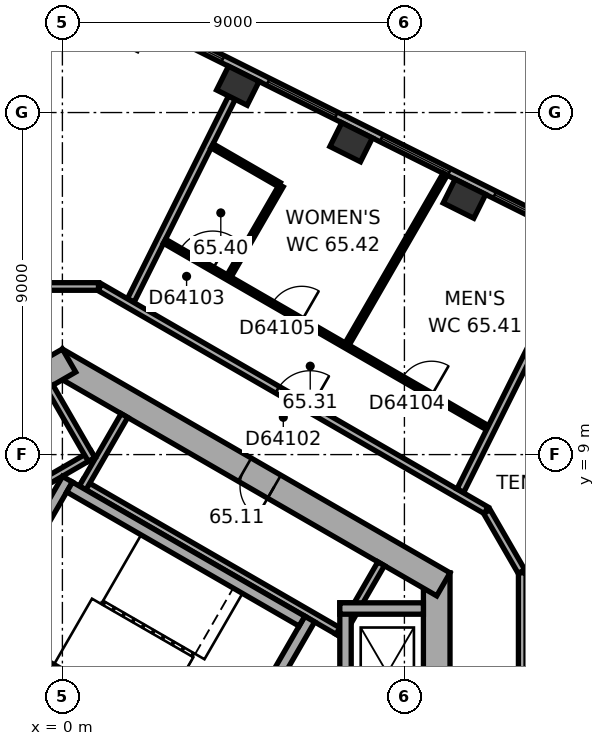
"""IFC4 building model, lengths in metres.
Left out: names, types, materials, properties, quantities, classifications, styles, units other than length and angle.
Written with IfcOpenShell. Run it as: python <this file> out.ifc"""

import sys

from ifc_helpers import new_model, si_unit, direction, frame, frame_2d, origin, origin_2d, place, context, subcontext, project, spatial, rectangle, extrude, element, fill, save


model = new_model("IFC4")
c1 = context("Model", 3, precision=1e-05, world=origin(), true_north=direction((0.0, 1.0)))
c2 = subcontext(c1, "Body", "Model", "MODEL_VIEW")
j1 = project(units=[si_unit("LENGTHUNIT", "METRE"), si_unit("PLANEANGLEUNIT", "RADIAN")], contexts=[c1])
p1 = place(None, origin())
s1 = spatial("IfcSite", under=j1, at=p1, CompositionType="ELEMENT")
p2 = place(p1, origin())
s2 = spatial("IfcBuilding", under=s1, at=p2, CompositionType="ELEMENT")
p3 = place(p2, frame((0.0, 0.0, 263.5)))
s3 = spatial("IfcBuildingStorey", under=s2, at=p3, CompositionType="ELEMENT", Elevation=263.5)
for number, where, z_axis, x_axis in (
    (1, (10.58, 15.732, 0.0), (0.0, 0.0, 1.0), (-0.895, 0.446, 0.0)),
    (2, (7.598, 17.219, 0.0), (0.0, 0.0, 1.0), (-0.895, 0.446, 0.0)),
    (3, (4.616, 18.706, 0.0), (0.0, 0.0, 1.0), (-0.895, 0.446, 0.0)),
):
    element("IfcColumn", number, at=place(p3, frame(where, z_axis=z_axis, x_axis=x_axis)), inside=s3, PredefinedType="COLUMN", context=c2, shape_type="SweptSolid", body=[
        extrude(rectangle(XDim=0.9, YDim=0.7, at=origin_2d()), origin(), (0.0, 0.0, 1.0), 3.7),
    ])
p4 = place(p3, frame((9.85, -5.889, 0.0), z_axis=(0.0, 0.0, 1.0), x_axis=(0.0, 1.0, 0.0)))
e4 = element("IfcWall", 4, at=p4, inside=s3, PredefinedType="SHEAR", context=c2, shape_type="SweptSolid", body=[
    extrude(rectangle(XDim=11.778, YDim=0.7, at=frame_2d((5.889, 0.0))), origin(), (0.0, 0.0, 1.0), 3.7),
])
p5 = place(p4, frame((6.089, 0.0, 0.0)))
e5 = element("IfcOpeningElement", 5, at=p5, cuts=e4, PredefinedType="OPENING", context=c2, shape_type="SweptSolid", body=[
    extrude(rectangle(XDim=1.5, YDim=2.1, at=frame_2d((0.75, 1.05))), frame((0.0, 0.36, 0.0), z_axis=(0.0, -1.0, 0.0), x_axis=(1.0, 0.0, 0.0)), (0.0, 0.0, 1.0), 0.72),
])
p6 = place(p4, frame((2.939, 0.0, 0.0)))
e6 = element("IfcOpeningElement", 6, at=p6, cuts=e4, PredefinedType="OPENING", context=c2, shape_type="SweptSolid", body=[
    extrude(rectangle(XDim=0.9, YDim=2.1, at=frame_2d((0.45, 1.05))), frame((0.0, 0.36, 0.0), z_axis=(0.0, -1.0, 0.0), x_axis=(1.0, 0.0, 0.0)), (0.0, 0.0, 1.0), 0.72),
])
p7 = place(p3, frame((10.025, 5.586, 0.0), z_axis=(0.0, 0.0, 1.0), x_axis=(-0.866026453023, 0.499998182661, 0.0)))
e7 = element("IfcWall", 7, at=p7, inside=s3, PredefinedType="SHEAR", context=c2, shape_type="SweptSolid", body=[
    extrude(rectangle(XDim=11.778, YDim=0.7, at=frame_2d((5.889, 0.0))), origin(), (0.0, 0.0, 1.0), 3.7),
])
p8 = place(p7, frame((5.139, 0.0, 0.0)))
e8 = element("IfcOpeningElement", 8, at=p8, cuts=e7, PredefinedType="OPENING", context=c2, shape_type="SweptSolid", body=[
    extrude(rectangle(XDim=0.9, YDim=2.1, at=frame_2d((0.45, 1.05))), frame((0.0, 0.36, 0.0), z_axis=(0.0, -1.0, 0.0), x_axis=(1.0, 0.0, 0.0)), (0.0, 0.0, 1.0), 0.72),
])
p9 = place(p3, frame((0.175, 11.475, 0.0), z_axis=(0.0, 0.0, 1.0), x_axis=(-0.866026453023, -0.499998182661, 0.0)))
e9 = element("IfcWall", 9, at=p9, inside=s3, PredefinedType="SHEAR", context=c2, shape_type="SweptSolid", body=[
    extrude(rectangle(XDim=11.778, YDim=0.7, at=frame_2d((5.889, 0.0))), origin(), (0.0, 0.0, 1.0), 3.7),
])
p10 = place(p9, frame((6.089, 0.0, 0.0)))
e10 = element("IfcOpeningElement", 10, at=p10, cuts=e9, PredefinedType="OPENING", context=c2, shape_type="SweptSolid", body=[
    extrude(rectangle(XDim=1.5, YDim=2.1, at=frame_2d((0.75, 1.05))), frame((0.0, 0.36, 0.0), z_axis=(0.0, -1.0, 0.0), x_axis=(1.0, 0.0, 0.0)), (0.0, 0.0, 1.0), 0.72),
])
p11 = place(p9, frame((2.939, 0.0, 0.0)))
e11 = element("IfcOpeningElement", 11, at=p11, cuts=e9, PredefinedType="OPENING", context=c2, shape_type="SweptSolid", body=[
    extrude(rectangle(XDim=0.9, YDim=2.1, at=frame_2d((0.45, 1.05))), frame((0.0, 0.36, 0.0), z_axis=(0.0, -1.0, 0.0), x_axis=(1.0, 0.0, 0.0)), (0.0, 0.0, 1.0), 0.72),
])
p12 = place(p3, frame((17.223, 12.923, 0.0), z_axis=(0.0, 0.0, 1.0), x_axis=(-0.894930561148, 0.44620543556, 0.0)))
e12 = element("IfcWall", 12, at=p12, inside=s3, PredefinedType="STANDARD", context=c2, shape_type="SweptSolid", body=[
    extrude(rectangle(XDim=17.731, YDim=0.2, at=frame_2d((8.866, 0.0))), origin(), (0.0, 0.0, 1.0), 3.7),
])
p13 = place(p12, frame((1.202, 0.0, 0.9)))
e13 = element("IfcOpeningElement", 13, at=p13, cuts=e12, PredefinedType="OPENING", context=c2, shape_type="SweptSolid", body=[
    extrude(rectangle(XDim=2.0, YDim=2.0, at=frame_2d((1.0, 1.0))), frame((0.0, 0.11, 0.0), z_axis=(0.0, -1.0, 0.0), x_axis=(1.0, 0.0, 0.0)), (0.0, 0.0, 1.0), 0.22),
])
p14 = place(p12, frame((4.533, 0.0, 0.9)))
e14 = element("IfcOpeningElement", 14, at=p14, cuts=e12, PredefinedType="OPENING", context=c2, shape_type="SweptSolid", body=[
    extrude(rectangle(XDim=2.0, YDim=2.0, at=frame_2d((1.0, 1.0))), frame((0.0, 0.11, 0.0), z_axis=(0.0, -1.0, 0.0), x_axis=(1.0, 0.0, 0.0)), (0.0, 0.0, 1.0), 0.22),
])
p15 = place(p12, frame((7.865, 0.0, 0.9)))
e15 = element("IfcOpeningElement", 15, at=p15, cuts=e12, PredefinedType="OPENING", context=c2, shape_type="SweptSolid", body=[
    extrude(rectangle(XDim=2.0, YDim=2.0, at=frame_2d((1.0, 1.0))), frame((0.0, 0.11, 0.0), z_axis=(0.0, -1.0, 0.0), x_axis=(1.0, 0.0, 0.0)), (0.0, 0.0, 1.0), 0.22),
])
p16 = place(p12, frame((11.197, 0.0, 0.9)))
e16 = element("IfcOpeningElement", 16, at=p16, cuts=e12, PredefinedType="OPENING", context=c2, shape_type="SweptSolid", body=[
    extrude(rectangle(XDim=2.0, YDim=2.0, at=frame_2d((1.0, 1.0))), frame((0.0, 0.11, 0.0), z_axis=(0.0, -1.0, 0.0), x_axis=(1.0, 0.0, 0.0)), (0.0, 0.0, 1.0), 0.22),
])
p17 = place(p12, frame((14.528, 0.0, 0.9)))
e17 = element("IfcOpeningElement", 17, at=p17, cuts=e12, PredefinedType="OPENING", context=c2, shape_type="SweptSolid", body=[
    extrude(rectangle(XDim=2.0, YDim=2.0, at=frame_2d((1.0, 1.0))), frame((0.0, 0.11, 0.0), z_axis=(0.0, -1.0, 0.0), x_axis=(1.0, 0.0, 0.0)), (0.0, 0.0, 1.0), 0.22),
])
p18 = place(p3, frame((7.424, 4.259, 0.0), z_axis=(0.0, 0.0, 1.0), x_axis=(-0.866026010844, 0.49999894854, 0.0)))
e18 = element("IfcWall", 18, at=p18, inside=s3, PredefinedType="PARTITIONING", context=c2, shape_type="SweptSolid", body=[
    extrude(rectangle(XDim=8.0, YDim=0.2, at=frame_2d((4.0, 0.0))), origin(), (0.0, 0.0, 1.0), 3.42),
])
for number, where, z_axis, x_axis in (
    (19, (7.287, 4.222, 0.0), (0.0, 0.0, 1.0), (0.5, 0.866, 0.0)),
    (20, (0.532, 8.122, 0.0), (0.0, 0.0, 1.0), (0.5, 0.866, 0.0)),
):
    element("IfcWall", number, at=place(p3, frame(where, z_axis=z_axis, x_axis=x_axis)), inside=s3, PredefinedType="PARTITIONING", context=c2, shape_type="SweptSolid", body=[
        extrude(rectangle(XDim=2.2, YDim=0.2, at=frame_2d((1.1, 0.0))), origin(), (0.0, 0.0, 1.0), 3.42),
    ])
p19 = place(p3, frame((0.803, 9.009, 0.0), z_axis=(0.0, 0.0, 1.0), x_axis=(-0.866028230842, -0.499995103361, 0.0)))
e21 = element("IfcWall", 21, at=p19, inside=s3, PredefinedType="PARTITIONING", context=c2, shape_type="SweptSolid", body=[
    extrude(rectangle(XDim=5.4, YDim=0.2, at=frame_2d((2.7, 0.0))), origin(), (0.0, 0.0, 1.0), 3.42),
])
p20 = place(p3, frame((0.767, 8.872, 0.0), z_axis=(0.0, 0.0, 1.0), x_axis=(-0.499994660107, 0.866028486751, 0.0)))
e22 = element("IfcWall", 22, at=p20, inside=s3, PredefinedType="PARTITIONING", context=c2, shape_type="SweptSolid", body=[
    extrude(rectangle(XDim=2.2, YDim=0.2, at=frame_2d((1.1, 0.0))), origin(), (0.0, 0.0, 1.0), 3.42),
])
p21 = place(p3, frame((4.158, 0.602, 0.0), z_axis=(0.0, 0.0, 1.0), x_axis=(0.499977259774, 0.866038532462, 0.0)))
e23 = element("IfcWall", 23, at=p21, inside=s3, PredefinedType="SHEAR", context=c2, shape_type="SweptSolid", body=[
    extrude(rectangle(XDim=4.7, YDim=0.3, at=frame_2d((2.35, 0.0))), origin(), (0.0, 0.0, 1.0), 3.42),
])
p22 = place(p21, frame((0.8, 0.0, 0.0)))
e24 = element("IfcOpeningElement", 24, at=p22, cuts=e23, PredefinedType="OPENING", context=c2, shape_type="SweptSolid", body=[
    extrude(rectangle(XDim=1.2, YDim=2.1, at=frame_2d((0.6, 1.05))), frame((0.0, 0.16, 0.0), z_axis=(0.0, -1.0, 0.0), x_axis=(1.0, 0.0, 0.0)), (0.0, 0.0, 1.0), 0.32),
])
p23 = place(p3, frame((-2.216, 4.282, 0.0), z_axis=(0.0, 0.0, 1.0), x_axis=(0.499977259774, 0.866038532462, 0.0)))
e25 = element("IfcWall", 25, at=p23, inside=s3, PredefinedType="SHEAR", context=c2, shape_type="SweptSolid", body=[
    extrude(rectangle(XDim=4.7, YDim=0.3, at=frame_2d((2.35, 0.0))), origin(), (0.0, 0.0, 1.0), 3.42),
])
for number, where, z_axis, x_axis in (
    (26, (4.103, 0.807, 0.0), (0.0, 0.0, 1.0), (-0.866, 0.5, 0.0)),
    (27, (6.303, 4.617, 0.0), (0.0, 0.0, 1.0), (-0.866, 0.5, 0.0)),
):
    element("IfcWall", number, at=place(p3, frame(where, z_axis=z_axis, x_axis=x_axis)), inside=s3, PredefinedType="SHEAR", context=c2, shape_type="SweptSolid", body=[
        extrude(rectangle(XDim=7.06, YDim=0.3, at=frame_2d((3.53, 0.0))), origin(), (0.0, 0.0, 1.0), 3.42),
    ])
p24 = place(p3, frame((7.45, 1.75, 0.0), z_axis=(0.0, 0.0, 1.0), x_axis=(0.0, 1.0, 0.0)))
e28 = element("IfcWall", 28, at=p24, inside=s3, PredefinedType="SHEAR", context=c2, shape_type="SweptSolid", body=[
    extrude(rectangle(XDim=3.35, YDim=0.3, at=frame_2d((1.675, 0.0))), origin(), (0.0, 0.0, 1.0), 3.42),
])
p25 = place(p3, frame((7.3, 4.95, 0.0), z_axis=(0.0, 0.0, 1.0), x_axis=(1.0, 0.0, 0.0)))
e29 = element("IfcWall", 29, at=p25, inside=s3, PredefinedType="SHEAR", context=c2, shape_type="SweptSolid", body=[
    extrude(rectangle(XDim=2.2, YDim=0.3, at=frame_2d((1.1, 0.0))), origin(), (0.0, 0.0, 1.0), 3.42),
])
p26 = place(p3, frame((0.95, 13.423, 0.0), z_axis=(0.0, 0.0, 1.0), x_axis=(-1.0, 0.0, 0.0)))
e30 = element("IfcWall", 30, at=p26, inside=s3, PredefinedType="PARTITIONING", context=c2, shape_type="SweptSolid", body=[
    extrude(rectangle(XDim=1.86, YDim=0.2, at=frame_2d((0.93, 0.0))), origin(), (0.0, 0.0, 1.0), 3.42),
])
p27 = place(p3, frame((4.388, 13.702, 0.0), z_axis=(0.0, 0.0, 1.0), x_axis=(0.500048966069, 0.865997131366, 0.0)))
e31 = element("IfcWall", 31, at=p27, inside=s3, PredefinedType="PARTITIONING", context=c2, shape_type="SweptSolid", body=[
    extrude(rectangle(XDim=2.74, YDim=0.12, at=frame_2d((1.37, 0.0))), origin(), (0.0, 0.0, 1.0), 3.42),
])
p28 = place(p3, frame((4.46, 18.392, 0.0), z_axis=(0.0, 0.0, 1.0), x_axis=(-0.446197360024, -0.894934587502, 0.0)))
e32 = element("IfcWall", 32, at=p28, inside=s3, PredefinedType="PARTITIONING", context=c2, shape_type="SweptSolid", body=[
    extrude(rectangle(XDim=5.96, YDim=0.2, at=frame_2d((2.98, 0.0))), origin(), (0.0, 0.0, 1.0), 2.87),
])
p29 = place(p3, frame((5.706, 16.104, 0.0), z_axis=(0.0, 0.0, 1.0), x_axis=(-0.866040114423, 0.499974519561, 0.0)))
e33 = element("IfcWall", 33, at=p29, inside=s3, PredefinedType="PARTITIONING", context=c2, shape_type="SweptSolid", body=[
    extrude(rectangle(XDim=2.04, YDim=0.12, at=frame_2d((1.02, 0.0))), origin(), (0.0, 0.0, 1.0), 3.42),
])
p30 = place(p3, frame((10.072, 16.376, 0.0), z_axis=(0.0, 0.0, 1.0), x_axis=(-0.499972385701, -0.86604134632, 0.0)))
e34 = element("IfcWall", 34, at=p30, inside=s3, PredefinedType="PARTITIONING", context=c2, shape_type="SweptSolid", body=[
    extrude(rectangle(XDim=5.158, YDim=0.12, at=frame_2d((2.579, 0.0))), origin(), (0.0, 0.0, 1.0), 2.87),
])
p31 = place(p3, frame((11.15, 7.534, 0.0), z_axis=(0.0, 0.0, 1.0), x_axis=(-0.866026603062, 0.499997922785, 0.0)))
e35 = element("IfcWall", 35, at=p31, inside=s3, PredefinedType="PARTITIONING", context=c2, shape_type="SweptSolid", body=[
    extrude(rectangle(XDim=11.738, YDim=0.2, at=frame_2d((5.869, 0.0))), origin(), (0.0, 0.0, 1.0), 3.42),
])
p32 = place(p31, frame((5.345, 0.0, 0.0)))
e36 = element("IfcOpeningElement", 36, at=p32, cuts=e35, PredefinedType="OPENING", context=c2, shape_type="SweptSolid", body=[
    extrude(rectangle(XDim=1.0, YDim=2.1, at=frame_2d((0.5, 1.05))), frame((0.0, 0.11, 0.0), z_axis=(0.0, -1.0, 0.0), x_axis=(1.0, 0.0, 0.0)), (0.0, 0.0, 1.0), 0.22),
])
p33 = place(p3, frame((11.187, 9.707, 0.0), z_axis=(0.0, 0.0, 1.0), x_axis=(-0.866033133531, 0.499986611447, 0.0)))
e37 = element("IfcWall", 37, at=p33, inside=s3, PredefinedType="PARTITIONING", context=c2, shape_type="SweptSolid", body=[
    extrude(rectangle(XDim=9.814, YDim=0.12, at=frame_2d((4.907, 0.0))), origin(), (0.0, 0.0, 1.0), 3.42),
])
p34 = place(p33, frame((8.349, 0.0, 0.0)))
e38 = element("IfcOpeningElement", 38, at=p34, cuts=e37, PredefinedType="OPENING", context=c2, shape_type="SweptSolid", body=[
    extrude(rectangle(XDim=1.0, YDim=2.1, at=frame_2d((0.5, 1.05))), frame((0.0, 0.07, 0.0), z_axis=(0.0, -1.0, 0.0), x_axis=(1.0, 0.0, 0.0)), (0.0, 0.0, 1.0), 0.14),
])
p35 = place(p33, frame((1.7, 0.0, 0.0)))
e39 = element("IfcOpeningElement", 39, at=p35, cuts=e37, PredefinedType="OPENING", context=c2, shape_type="SweptSolid", body=[
    extrude(rectangle(XDim=0.9, YDim=2.1, at=frame_2d((0.45, 1.05))), frame((0.0, 0.07, 0.0), z_axis=(0.0, -1.0, 0.0), x_axis=(1.0, 0.0, 0.0)), (0.0, 0.0, 1.0), 0.14),
])
p36 = place(p33, frame((5.642, 0.0, 0.0)))
e40 = element("IfcOpeningElement", 40, at=p36, cuts=e37, PredefinedType="OPENING", context=c2, shape_type="SweptSolid", body=[
    extrude(rectangle(XDim=0.9, YDim=2.1, at=frame_2d((0.45, 1.05))), frame((0.0, 0.07, 0.0), z_axis=(0.0, -1.0, 0.0), x_axis=(1.0, 0.0, 0.0)), (0.0, 0.0, 1.0), 0.14),
])
p37 = place(p3, frame((12.08, 5.924, 0.0), z_axis=(0.0, 0.0, 1.0), x_axis=(-0.500004960326, 0.86602253992, 0.0)))
e41 = element("IfcWall", 41, at=p37, inside=s3, PredefinedType="PARTITIONING", context=c2, shape_type="SweptSolid", body=[
    extrude(rectangle(XDim=1.82, YDim=0.2, at=frame_2d((0.91, 0.0))), origin(), (0.0, 0.0, 1.0), 3.42),
])
p38 = place(p3, frame((12.1, 2.448, 0.0), z_axis=(0.0, 0.0, 1.0), x_axis=(0.0, 1.0, 0.0)))
e42 = element("IfcWall", 42, at=p38, inside=s3, PredefinedType="PARTITIONING", context=c2, shape_type="SweptSolid", body=[
    extrude(rectangle(XDim=3.441, YDim=0.2, at=frame_2d((1.72, 0.0))), origin(), (0.0, 0.0, 1.0), 3.42),
])
p39 = place(p3, frame((13.405, 13.933, 0.0), z_axis=(0.0, 0.0, 1.0), x_axis=(-0.446187838644, -0.894939334618, 0.0)))
e43 = element("IfcWall", 43, at=p39, inside=s3, PredefinedType="PARTITIONING", context=c2, shape_type="SweptSolid", body=[
    extrude(rectangle(XDim=6.571, YDim=0.2, at=frame_2d((3.286, 0.0))), origin(), (0.0, 0.0, 1.0), 3.42),
])
p40 = place(p14, origin())
e44 = element("IfcWindow", 44, at=p40, inside=s3, PartitioningType="SINGLE_PANEL", PredefinedType="WINDOW", context=c2, shape_type="SweptSolid", body=[
    extrude(rectangle(XDim=2.0, YDim=2.0, at=frame_2d((1.0, 1.0))), frame((0.0, 0.03, 0.0), z_axis=(0.0, -1.0, 0.0), x_axis=(1.0, 0.0, 0.0)), (0.0, 0.0, 1.0), 0.06),
])
fill(e14, e44)
p41 = place(p15, origin())
e45 = element("IfcWindow", 45, at=p41, inside=s3, PartitioningType="SINGLE_PANEL", PredefinedType="WINDOW", context=c2, shape_type="SweptSolid", body=[
    extrude(rectangle(XDim=2.0, YDim=2.0, at=frame_2d((1.0, 1.0))), frame((0.0, 0.03, 0.0), z_axis=(0.0, -1.0, 0.0), x_axis=(1.0, 0.0, 0.0)), (0.0, 0.0, 1.0), 0.06),
])
fill(e15, e45)
p42 = place(p16, origin())
e46 = element("IfcWindow", 46, at=p42, inside=s3, PartitioningType="SINGLE_PANEL", PredefinedType="WINDOW", context=c2, shape_type="SweptSolid", body=[
    extrude(rectangle(XDim=2.0, YDim=2.0, at=frame_2d((1.0, 1.0))), frame((0.0, 0.03, 0.0), z_axis=(0.0, -1.0, 0.0), x_axis=(1.0, 0.0, 0.0)), (0.0, 0.0, 1.0), 0.06),
])
fill(e16, e46)
p43 = place(p17, origin())
e47 = element("IfcWindow", 47, at=p43, inside=s3, PartitioningType="SINGLE_PANEL", PredefinedType="WINDOW", context=c2, shape_type="SweptSolid", body=[
    extrude(rectangle(XDim=2.0, YDim=2.0, at=frame_2d((1.0, 1.0))), frame((0.0, 0.03, 0.0), z_axis=(0.0, -1.0, 0.0), x_axis=(1.0, 0.0, 0.0)), (0.0, 0.0, 1.0), 0.06),
])
fill(e17, e47)
p44 = place(p8, origin())
e48 = element("IfcDoor", 48, at=p44, inside=s3, OperationType="SINGLE_SWING_LEFT", PredefinedType="DOOR", context=c2, shape_type="SweptSolid", body=[
    extrude(rectangle(XDim=0.9, YDim=2.1, at=frame_2d((0.45, 1.05))), frame((0.0, 0.025, 0.0), z_axis=(0.0, -1.0, 0.0), x_axis=(1.0, 0.0, 0.0)), (0.0, 0.0, 1.0), 0.05),
])
fill(e8, e48)
p45 = place(p32, origin())
e49 = element("IfcDoor", 49, at=p45, inside=s3, OperationType="SINGLE_SWING_LEFT", PredefinedType="DOOR", context=c2, shape_type="SweptSolid", body=[
    extrude(rectangle(XDim=1.0, YDim=2.1, at=frame_2d((0.5, 1.05))), frame((0.0, 0.025, 0.0), z_axis=(0.0, -1.0, 0.0), x_axis=(1.0, 0.0, 0.0)), (0.0, 0.0, 1.0), 0.05),
])
fill(e36, e49)
p46 = place(p34, origin())
e50 = element("IfcDoor", 50, at=p46, inside=s3, OperationType="SINGLE_SWING_LEFT", PredefinedType="DOOR", context=c2, shape_type="SweptSolid", body=[
    extrude(rectangle(XDim=1.0, YDim=2.1, at=frame_2d((0.5, 1.05))), frame((0.0, 0.025, 0.0), z_axis=(0.0, -1.0, 0.0), x_axis=(1.0, 0.0, 0.0)), (0.0, 0.0, 1.0), 0.05),
])
fill(e38, e50)
p47 = place(p35, origin())
e51 = element("IfcDoor", 51, at=p47, inside=s3, OperationType="SINGLE_SWING_LEFT", PredefinedType="DOOR", context=c2, shape_type="SweptSolid", body=[
    extrude(rectangle(XDim=0.9, YDim=2.1, at=frame_2d((0.45, 1.05))), frame((0.0, 0.025, 0.0), z_axis=(0.0, -1.0, 0.0), x_axis=(1.0, 0.0, 0.0)), (0.0, 0.0, 1.0), 0.05),
])
fill(e39, e51)
p48 = place(p36, origin())
e52 = element("IfcDoor", 52, at=p48, inside=s3, OperationType="SINGLE_SWING_LEFT", PredefinedType="DOOR", context=c2, shape_type="SweptSolid", body=[
    extrude(rectangle(XDim=0.9, YDim=2.1, at=frame_2d((0.45, 1.05))), frame((0.0, 0.025, 0.0), z_axis=(0.0, -1.0, 0.0), x_axis=(1.0, 0.0, 0.0)), (0.0, 0.0, 1.0), 0.05),
])
fill(e40, e52)
save(model, sys.argv[1])
